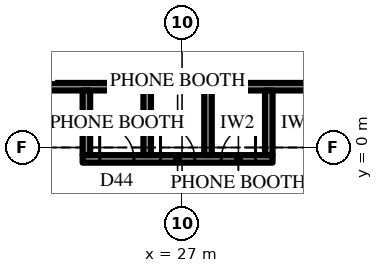
"""IFC4 building model, lengths in metres.
Left out: names, types, materials, properties, quantities, classifications, styles, units other than length and angle.
Written with IfcOpenShell. Run it as: python <this file> out.ifc"""

import sys

from ifc_helpers import new_model, si_unit, direction, frame, frame_2d, origin, place, context, subcontext, project, spatial, rectangle, extrude, element, fill, save


model = new_model("IFC4")
c1 = context("Model", 3, precision=1e-05, world=origin(), true_north=direction((0.0, 1.0)))
c2 = subcontext(c1, "Body", "Model", "MODEL_VIEW")
j1 = project(units=[si_unit("LENGTHUNIT", "METRE"), si_unit("PLANEANGLEUNIT", "RADIAN")], contexts=[c1])
p1 = place(None, origin())
s1 = spatial("IfcSite", under=j1, at=p1, CompositionType="ELEMENT")
p2 = place(p1, origin())
s2 = spatial("IfcBuilding", under=s1, at=p2, CompositionType="ELEMENT")
p3 = place(p2, frame((0.0, 0.0, 165.7)))
s3 = spatial("IfcBuildingStorey", under=s2, at=p3, CompositionType="ELEMENT", Elevation=165.7)
p4 = place(p3, frame((18.6, 1.6, 0.0), z_axis=(0.0, 0.0, 1.0), x_axis=(1.0, 0.0, 0.0)))
e1 = element("IfcWall", 1, at=p4, inside=s3, PredefinedType="PARTITIONING", context=c2, shape_type="SweptSolid", body=[
    extrude(rectangle(XDim=15.059, YDim=0.2, at=frame_2d((7.53, 0.0))), origin(), (0.0, 0.0, 1.0), 4.0),
])
p5 = place(p4, frame((1.006, 0.0, 0.0)))
e2 = element("IfcOpeningElement", 2, at=p5, cuts=e1, PredefinedType="OPENING", context=c2, shape_type="SweptSolid", body=[
    extrude(rectangle(XDim=1.0, YDim=2.2, at=frame_2d((0.5, 1.1))), frame((0.0, 0.11, 0.0), z_axis=(0.0, -1.0, 0.0), x_axis=(1.0, 0.0, 0.0)), (0.0, 0.0, 1.0), 0.22),
])
p6 = place(p3, frame((24.383, -0.3, 0.0), z_axis=(0.0, 0.0, 1.0), x_axis=(1.0, 0.0, 0.0)))
e3 = element("IfcWall", 3, at=p6, inside=s3, PredefinedType="PARTITIONING", context=c2, shape_type="SweptSolid", body=[
    extrude(rectangle(XDim=5.0, YDim=0.2, at=frame_2d((2.5, 0.0))), origin(), (0.0, 0.0, 1.0), 4.0),
])
p7 = place(p6, frame((0.45, 0.0, 0.0)))
e4 = element("IfcOpeningElement", 4, at=p7, cuts=e3, PredefinedType="OPENING", context=c2, shape_type="SweptSolid", body=[
    extrude(rectangle(XDim=0.9, YDim=2.2, at=frame_2d((0.45, 1.1))), frame((0.0, 0.11, 0.0), z_axis=(0.0, -1.0, 0.0), x_axis=(1.0, 0.0, 0.0)), (0.0, 0.0, 1.0), 0.22),
])
p8 = place(p6, frame((2.05, 0.0, 0.0)))
e5 = element("IfcOpeningElement", 5, at=p8, cuts=e3, PredefinedType="OPENING", context=c2, shape_type="SweptSolid", body=[
    extrude(rectangle(XDim=0.9, YDim=2.2, at=frame_2d((0.45, 1.1))), frame((0.0, 0.11, 0.0), z_axis=(0.0, -1.0, 0.0), x_axis=(1.0, 0.0, 0.0)), (0.0, 0.0, 1.0), 0.22),
])
p9 = place(p6, frame((3.65, 0.0, 0.0)))
e6 = element("IfcOpeningElement", 6, at=p9, cuts=e3, PredefinedType="OPENING", context=c2, shape_type="SweptSolid", body=[
    extrude(rectangle(XDim=0.9, YDim=2.2, at=frame_2d((0.45, 1.1))), frame((0.0, 0.11, 0.0), z_axis=(0.0, -1.0, 0.0), x_axis=(1.0, 0.0, 0.0)), (0.0, 0.0, 1.0), 0.22),
])
for number, where, z_axis, x_axis in (
    (7, (24.483, 1.5, 0.0), (0.0, 0.0, 1.0), (0.0, -1.0, 0.0)),
    (8, (26.083, 1.5, 0.0), (0.0, 0.0, 1.0), (0.0, -1.0, 0.0)),
    (9, (27.683, 1.5, 0.0), (0.0, 0.0, 1.0), (0.0, -1.0, 0.0)),
    (10, (29.283, 1.5, 0.0), (0.0, 0.0, 1.0), (0.0, -1.0, 0.0)),
):
    element("IfcWall", number, at=place(p3, frame(where, z_axis=z_axis, x_axis=x_axis)), inside=s3, PredefinedType="PARTITIONING", context=c2, shape_type="SweptSolid", body=[
        extrude(rectangle(XDim=1.7, YDim=0.2, at=frame_2d((0.85, 0.0))), origin(), (0.0, 0.0, 1.0), 4.0),
    ])
p10 = place(p7, origin())
e11 = element("IfcDoor", 11, at=p10, inside=s3, OperationType="SINGLE_SWING_RIGHT", PredefinedType="DOOR", context=c2, shape_type="SweptSolid", body=[
    extrude(rectangle(XDim=0.9, YDim=2.2, at=frame_2d((0.45, 1.1))), frame((0.0, 0.025, 0.0), z_axis=(0.0, -1.0, 0.0), x_axis=(1.0, 0.0, 0.0)), (0.0, 0.0, 1.0), 0.05),
])
fill(e4, e11)
p11 = place(p8, origin())
e12 = element("IfcDoor", 12, at=p11, inside=s3, OperationType="SINGLE_SWING_RIGHT", PredefinedType="DOOR", context=c2, shape_type="SweptSolid", body=[
    extrude(rectangle(XDim=0.9, YDim=2.2, at=frame_2d((0.45, 1.1))), frame((0.0, 0.025, 0.0), z_axis=(0.0, -1.0, 0.0), x_axis=(1.0, 0.0, 0.0)), (0.0, 0.0, 1.0), 0.05),
])
fill(e5, e12)
p12 = place(p9, origin())
e13 = element("IfcDoor", 13, at=p12, inside=s3, OperationType="SINGLE_SWING_LEFT", PredefinedType="DOOR", context=c2, shape_type="SweptSolid", body=[
    extrude(rectangle(XDim=0.9, YDim=2.2, at=frame_2d((0.45, 1.1))), frame((0.0, 0.025, 0.0), z_axis=(0.0, -1.0, 0.0), x_axis=(1.0, 0.0, 0.0)), (0.0, 0.0, 1.0), 0.05),
])
fill(e6, e13)
save(model, sys.argv[1])
